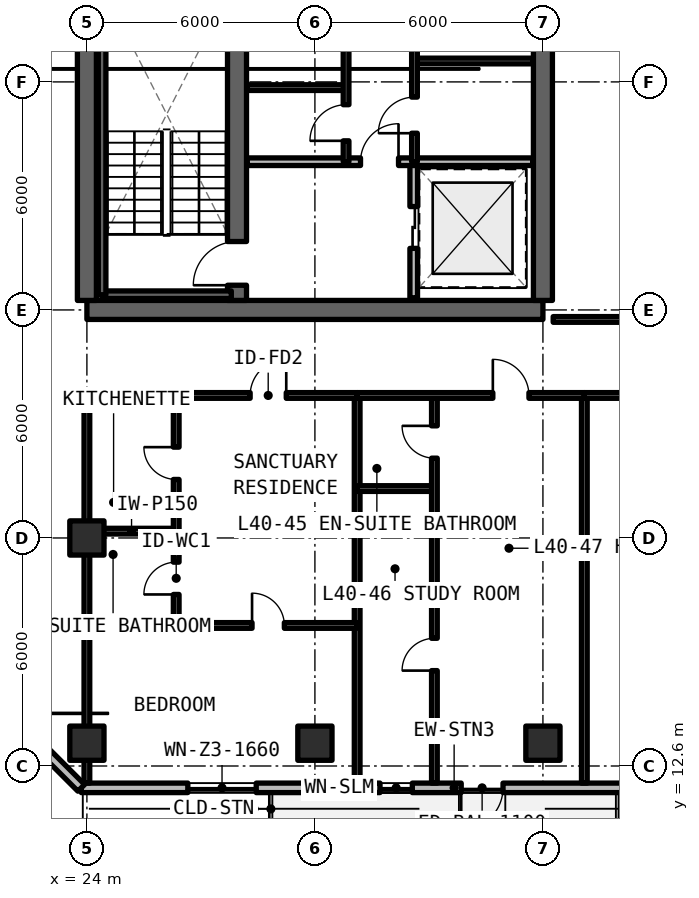
"""IFC4 building model, lengths in metres.
Left out: names, types, materials, properties, quantities, classifications, styles, units other than length and angle.
Written with IfcOpenShell. Run it as: python <this file> out.ifc"""

import sys

from ifc_helpers import new_model, si_unit, direction, frame, frame_2d, origin, origin_2d, place, context, subcontext, project, spatial, rectangle, extrude, element, fill, save


model = new_model("IFC4")
c1 = context("Model", 3, precision=1e-05, world=origin(), true_north=direction((0.0, 1.0)))
c2 = subcontext(c1, "Body", "Model", "MODEL_VIEW")
j1 = project(units=[si_unit("LENGTHUNIT", "METRE"), si_unit("PLANEANGLEUNIT", "RADIAN")], contexts=[c1])
p1 = place(None, origin())
s1 = spatial("IfcSite", under=j1, at=p1, CompositionType="ELEMENT")
p2 = place(p1, origin())
s2 = spatial("IfcBuilding", under=s1, at=p2, CompositionType="ELEMENT")
p3 = place(p2, frame((0.0, 0.0, 145.2)))
s3 = spatial("IfcBuildingStorey", under=s2, at=p3, CompositionType="ELEMENT", Elevation=145.2)
p4 = place(p3, frame((24.0, 24.6, 0.0), z_axis=(0.0, 0.0, 1.0), x_axis=(1.0, 0.0, 0.0)))
e1 = element("IfcWall", 1, at=p4, inside=s3, PredefinedType="SHEAR", context=c2, shape_type="SweptSolid", body=[
    extrude(rectangle(XDim=12.0, YDim=0.5, at=frame_2d((6.0, 0.0))), origin(), (0.0, 0.0, 1.0), 3.3),
])
p5 = place(p3, frame((24.0, 24.85, 0.0), z_axis=(0.0, 0.0, 1.0), x_axis=(0.0, 1.0, 0.0)))
e2 = element("IfcWall", 2, at=p5, inside=s3, PredefinedType="SHEAR", context=c2, shape_type="SweptSolid", body=[
    extrude(rectangle(XDim=17.5, YDim=0.5, at=frame_2d((8.75, 0.0))), origin(), (0.0, 0.0, 1.0), 3.3),
])
p6 = place(p3, frame((36.0, 24.85, 0.0), z_axis=(0.0, 0.0, 1.0), x_axis=(0.0, 1.0, 0.0)))
e3 = element("IfcWall", 3, at=p6, inside=s3, PredefinedType="SHEAR", context=c2, shape_type="SweptSolid", body=[
    extrude(rectangle(XDim=8.95, YDim=0.5, at=frame_2d((4.475, 0.0))), origin(), (0.0, 0.0, 1.0), 3.3),
])
p7 = place(p3, frame((27.95, 24.85, 0.0), z_axis=(0.0, 0.0, 1.0), x_axis=(0.0, 1.0, 0.0)))
e4 = element("IfcWall", 4, at=p7, inside=s3, PredefinedType="SHEAR", context=c2, shape_type="SweptSolid", body=[
    extrude(rectangle(XDim=17.5, YDim=0.5, at=frame_2d((8.75, 0.0))), origin(), (0.0, 0.0, 1.0), 3.3),
])
p8 = place(p7, frame((0.4, 0.0, 0.0)))
e5 = element("IfcOpeningElement", 5, at=p8, cuts=e4, PredefinedType="OPENING", context=c2, shape_type="SweptSolid", body=[
    extrude(rectangle(XDim=1.15, YDim=2.15, at=frame_2d((0.575, 1.075))), frame((0.0, 0.26, 0.0), z_axis=(0.0, -1.0, 0.0), x_axis=(1.0, 0.0, 0.0)), (0.0, 0.0, 1.0), 0.52),
])
p9 = place(p7, frame((9.6, 0.0, 0.0)))
e6 = element("IfcOpeningElement", 6, at=p9, cuts=e4, PredefinedType="OPENING", context=c2, shape_type="SweptSolid", body=[
    extrude(rectangle(XDim=1.15, YDim=2.15, at=frame_2d((0.575, 1.075))), frame((0.0, 0.26, 0.0), z_axis=(0.0, -1.0, 0.0), x_axis=(1.0, 0.0, 0.0)), (0.0, 0.0, 1.0), 0.52),
])
for number, where, z_axis, x_axis in (
    (7, (24.0, 18.6, 0.0), (0.0, 0.0, 1.0), (1.0, 0.0, 0.0)),
    (8, (24.0, 13.2, 0.0), (0.0, 0.0, 1.0), (1.0, 0.0, 0.0)),
    (9, (30.0, 13.2, 0.0), (0.0, 0.0, 1.0), (1.0, 0.0, 0.0)),
    (10, (36.0, 13.2, 0.0), (0.0, 0.0, 1.0), (1.0, 0.0, 0.0)),
):
    element("IfcColumn", number, at=place(p3, frame(where, z_axis=z_axis, x_axis=x_axis)), inside=s3, PredefinedType="COLUMN", context=c2, shape_type="SweptSolid", body=[
        extrude(rectangle(XDim=0.9, YDim=0.9, at=origin_2d()), origin(), (0.0, 0.0, 1.0), 3.3),
    ])
p10 = place(p3, frame((23.852, 12.025, 0.0), z_axis=(0.0, 0.0, 1.0), x_axis=(1.0, 0.0, 0.0)))
e11 = element("IfcWall", 11, at=p10, inside=s3, PredefinedType="SOLIDWALL", context=c2, shape_type="SweptSolid", body=[
    extrude(rectangle(XDim=19.623, YDim=0.25, at=frame_2d((9.812, 0.0))), origin(), (0.0, 0.0, 1.0), 3.08),
])
p11 = place(p10, frame((9.998, 0.0, 0.0)))
e12 = element("IfcOpeningElement", 12, at=p11, cuts=e11, PredefinedType="OPENING", context=c2, shape_type="SweptSolid", body=[
    extrude(rectangle(XDim=1.1, YDim=2.15, at=frame_2d((0.55, 1.075))), frame((0.0, 0.135, 0.0), z_axis=(0.0, -1.0, 0.0), x_axis=(1.0, 0.0, 0.0)), (0.0, 0.0, 1.0), 0.27),
])
p12 = place(p10, frame((2.804, 0.0, 0.78)))
e13 = element("IfcOpeningElement", 13, at=p12, cuts=e11, PredefinedType="OPENING", context=c2, shape_type="SweptSolid", body=[
    extrude(rectangle(XDim=1.8, YDim=1.66, at=frame_2d((0.9, 0.83))), frame((0.0, 0.135, 0.0), z_axis=(0.0, -1.0, 0.0), x_axis=(1.0, 0.0, 0.0)), (0.0, 0.0, 1.0), 0.27),
])
p13 = place(p10, frame((7.861, 0.0, 0.78)))
e14 = element("IfcOpeningElement", 14, at=p13, cuts=e11, PredefinedType="OPENING", context=c2, shape_type="SweptSolid", body=[
    extrude(rectangle(XDim=0.85, YDim=1.65, at=frame_2d((0.425, 0.825))), frame((0.0, 0.135, 0.0), z_axis=(0.0, -1.0, 0.0), x_axis=(1.0, 0.0, 0.0)), (0.0, 0.0, 1.0), 0.27),
])
p14 = place(p10, frame((15.533, 0.0, 0.78)))
e15 = element("IfcOpeningElement", 15, at=p14, cuts=e11, PredefinedType="OPENING", context=c2, shape_type="SweptSolid", body=[
    extrude(rectangle(XDim=1.8, YDim=1.66, at=frame_2d((0.9, 0.83))), frame((0.0, 0.135, 0.0), z_axis=(0.0, -1.0, 0.0), x_axis=(1.0, 0.0, 0.0)), (0.0, 0.0, 1.0), 0.27),
])
p15 = place(p3, frame((19.725, 16.152, 0.0), z_axis=(0.0, 0.0, 1.0), x_axis=(0.70708586489, -0.707127696864, 0.0)))
e16 = element("IfcWall", 16, at=p15, inside=s3, PredefinedType="SOLIDWALL", context=c2, shape_type="SweptSolid", body=[
    extrude(rectangle(XDim=5.836, YDim=0.25, at=frame_2d((2.918, 0.0))), origin(), (0.0, 0.0, 1.0), 3.08),
])
p16 = place(p15, frame((0.898, 0.0, 0.78)))
e17 = element("IfcOpeningElement", 17, at=p16, cuts=e16, PredefinedType="OPENING", context=c2, shape_type="SweptSolid", body=[
    extrude(rectangle(XDim=3.4, YDim=1.66, at=frame_2d((1.7, 0.83))), frame((0.0, 0.135, 0.0), z_axis=(0.0, -1.0, 0.0), x_axis=(1.0, 0.0, 0.0)), (0.0, 0.0, 1.0), 0.27),
])
p17 = place(p3, frame((32.6, 24.92, 0.0), z_axis=(0.0, 0.0, 1.0), x_axis=(0.0, 1.0, 0.0)))
e18 = element("IfcWall", 18, at=p17, inside=s3, PredefinedType="SOLIDWALL", context=c2, shape_type="SweptSolid", body=[
    extrude(rectangle(XDim=3.58, YDim=0.2, at=frame_2d((1.79, 0.0))), origin(), (0.0, 0.0, 1.0), 2.35),
])
p18 = place(p17, frame((1.3, 0.0, 0.0)))
e19 = element("IfcOpeningElement", 19, at=p18, cuts=e18, PredefinedType="OPENING", context=c2, shape_type="SweptSolid", body=[
    extrude(rectangle(XDim=1.1, YDim=2.2, at=frame_2d((0.55, 1.1))), frame((0.0, 0.11, 0.0), z_axis=(0.0, -1.0, 0.0), x_axis=(1.0, 0.0, 0.0)), (0.0, 0.0, 1.0), 0.22),
])
p19 = place(p3, frame((28.22, 28.5, 0.0), z_axis=(0.0, 0.0, 1.0), x_axis=(1.0, 0.0, 0.0)))
e20 = element("IfcWall", 20, at=p19, inside=s3, PredefinedType="SOLIDWALL", context=c2, shape_type="SweptSolid", body=[
    extrude(rectangle(XDim=7.51, YDim=0.2, at=frame_2d((3.755, 0.0))), origin(), (0.0, 0.0, 1.0), 2.35),
])
p20 = place(p19, frame((2.98, 0.0, 0.0)))
e21 = element("IfcOpeningElement", 21, at=p20, cuts=e20, PredefinedType="OPENING", context=c2, shape_type="SweptSolid", body=[
    extrude(rectangle(XDim=1.0, YDim=2.15, at=frame_2d((0.5, 1.075))), frame((0.0, 0.11, 0.0), z_axis=(0.0, -1.0, 0.0), x_axis=(1.0, 0.0, 0.0)), (0.0, 0.0, 1.0), 0.22),
])
p21 = place(p3, frame((28.22, 30.45, 0.0), z_axis=(0.0, 0.0, 1.0), x_axis=(1.0, 0.0, 0.0)))
e22 = element("IfcWall", 22, at=p21, inside=s3, PredefinedType="SOLIDWALL", context=c2, shape_type="SweptSolid", body=[
    extrude(rectangle(XDim=2.58, YDim=0.15, at=frame_2d((1.29, 0.0))), origin(), (0.0, 0.0, 1.0), 2.35),
])
p22 = place(p3, frame((30.82, 28.5, 0.0), z_axis=(0.0, 0.0, 1.0), x_axis=(0.0, 1.0, 0.0)))
e23 = element("IfcWall", 23, at=p22, inside=s3, PredefinedType="SOLIDWALL", context=c2, shape_type="SweptSolid", body=[
    extrude(rectangle(XDim=5.22, YDim=0.15, at=frame_2d((2.61, 0.0))), origin(), (0.0, 0.0, 1.0), 2.35),
])
p23 = place(p22, frame((0.55, 0.0, 0.0)))
e24 = element("IfcOpeningElement", 24, at=p23, cuts=e23, PredefinedType="OPENING", context=c2, shape_type="SweptSolid", body=[
    extrude(rectangle(XDim=0.95, YDim=2.15, at=frame_2d((0.475, 1.075))), frame((0.0, 0.085, 0.0), z_axis=(0.0, -1.0, 0.0), x_axis=(1.0, 0.0, 0.0)), (0.0, 0.0, 1.0), 0.17),
])
p24 = place(p22, frame((3.35, 0.0, 0.0)))
e25 = element("IfcOpeningElement", 25, at=p24, cuts=e23, PredefinedType="OPENING", context=c2, shape_type="SweptSolid", body=[
    extrude(rectangle(XDim=0.95, YDim=2.15, at=frame_2d((0.475, 1.075))), frame((0.0, 0.085, 0.0), z_axis=(0.0, -1.0, 0.0), x_axis=(1.0, 0.0, 0.0)), (0.0, 0.0, 1.0), 0.17),
])
p25 = place(p3, frame((32.68, 31.15, 0.0), z_axis=(0.0, 0.0, 1.0), x_axis=(1.0, 0.0, 0.0)))
e26 = element("IfcWall", 26, at=p25, inside=s3, PredefinedType="SOLIDWALL", context=c2, shape_type="SweptSolid", body=[
    extrude(rectangle(XDim=3.05, YDim=0.15, at=frame_2d((1.525, 0.0))), origin(), (0.0, 0.0, 1.0), 2.35),
])
p26 = place(p3, frame((32.62, 28.5, 0.0), z_axis=(0.0, 0.0, 1.0), x_axis=(0.0, 1.0, 0.0)))
e27 = element("IfcWall", 27, at=p26, inside=s3, PredefinedType="SOLIDWALL", context=c2, shape_type="SweptSolid", body=[
    extrude(rectangle(XDim=5.22, YDim=0.15, at=frame_2d((2.61, 0.0))), origin(), (0.0, 0.0, 1.0), 2.35),
])
p27 = place(p26, frame((0.75, 0.0, 0.0)))
e28 = element("IfcOpeningElement", 28, at=p27, cuts=e27, PredefinedType="OPENING", context=c2, shape_type="SweptSolid", body=[
    extrude(rectangle(XDim=0.95, YDim=2.15, at=frame_2d((0.475, 1.075))), frame((0.0, 0.085, 0.0), z_axis=(0.0, -1.0, 0.0), x_axis=(1.0, 0.0, 0.0)), (0.0, 0.0, 1.0), 0.17),
])
p28 = place(p26, frame((3.35, 0.0, 0.0)))
e29 = element("IfcOpeningElement", 29, at=p28, cuts=e27, PredefinedType="OPENING", context=c2, shape_type="SweptSolid", body=[
    extrude(rectangle(XDim=0.95, YDim=2.15, at=frame_2d((0.475, 1.075))), frame((0.0, 0.085, 0.0), z_axis=(0.0, -1.0, 0.0), x_axis=(1.0, 0.0, 0.0)), (0.0, 0.0, 1.0), 0.17),
])
p29 = place(p3, frame((36.27, 24.35, 0.0), z_axis=(0.0, 0.0, 1.0), x_axis=(1.0, 0.0, 0.0)))
e30 = element("IfcWall", 30, at=p29, inside=s3, PredefinedType="SOLIDWALL", context=c2, shape_type="SweptSolid", body=[
    extrude(rectangle(XDim=7.88, YDim=0.15, at=frame_2d((3.94, 0.0))), origin(), (0.0, 0.0, 1.0), 2.35),
])
for number, where, z_axis, x_axis in (
    (31, (24.0, 12.15, 0.0), (0.0, 0.0, 1.0), (0.0, 1.0, 0.0)),
    (32, (31.112, 12.15, 0.0), (0.0, 0.0, 1.0), (0.0, 1.0, 0.0)),
):
    element("IfcWall", number, at=place(p3, frame(where, z_axis=z_axis, x_axis=x_axis)), inside=s3, PredefinedType="SOLIDWALL", context=c2, shape_type="SweptSolid", body=[
        extrude(rectangle(XDim=10.2, YDim=0.15, at=frame_2d((5.1, 0.0))), origin(), (0.0, 0.0, 1.0), 2.35),
    ])
p30 = place(p3, frame((24.0, 18.779, 0.0), z_axis=(0.0, 0.0, 1.0), x_axis=(1.0, 0.0, 0.0)))
e33 = element("IfcWall", 33, at=p30, inside=s3, PredefinedType="PARTITIONING", context=c2, shape_type="SweptSolid", body=[
    extrude(rectangle(XDim=2.35, YDim=0.15, at=frame_2d((1.175, 0.0))), origin(), (0.0, 0.0, 1.0), 2.35),
])
p31 = place(p3, frame((26.35, 16.298, 0.0), z_axis=(0.0, 0.0, 1.0), x_axis=(0.0, 1.0, 0.0)))
e34 = element("IfcWall", 34, at=p31, inside=s3, PredefinedType="PARTITIONING", context=c2, shape_type="SweptSolid", body=[
    extrude(rectangle(XDim=6.052, YDim=0.15, at=frame_2d((3.026, 0.0))), origin(), (0.0, 0.0, 1.0), 2.35),
])
p32 = place(p31, frame((0.816, 0.0, 0.0)))
e35 = element("IfcOpeningElement", 35, at=p32, cuts=e34, PredefinedType="OPENING", context=c2, shape_type="SweptSolid", body=[
    extrude(rectangle(XDim=0.85, YDim=2.1, at=frame_2d((0.425, 1.05))), frame((0.0, 0.085, 0.0), z_axis=(0.0, -1.0, 0.0), x_axis=(1.0, 0.0, 0.0)), (0.0, 0.0, 1.0), 0.17),
])
p33 = place(p31, frame((3.842, 0.0, 0.0)))
e36 = element("IfcOpeningElement", 36, at=p33, cuts=e34, PredefinedType="OPENING", context=c2, shape_type="SweptSolid", body=[
    extrude(rectangle(XDim=0.85, YDim=2.1, at=frame_2d((0.425, 1.05))), frame((0.0, 0.085, 0.0), z_axis=(0.0, -1.0, 0.0), x_axis=(1.0, 0.0, 0.0)), (0.0, 0.0, 1.0), 0.17),
])
p34 = place(p3, frame((24.0, 16.298, 0.0), z_axis=(0.0, 0.0, 1.0), x_axis=(1.0, 0.0, 0.0)))
e37 = element("IfcWall", 37, at=p34, inside=s3, PredefinedType="PARTITIONING", context=c2, shape_type="SweptSolid", body=[
    extrude(rectangle(XDim=7.112, YDim=0.15, at=frame_2d((3.556, 0.0))), origin(), (0.0, 0.0, 1.0), 2.35),
])
p35 = place(p34, frame((4.346, 0.0, 0.0)))
e38 = element("IfcOpeningElement", 38, at=p35, cuts=e37, PredefinedType="OPENING", context=c2, shape_type="SweptSolid", body=[
    extrude(rectangle(XDim=0.85, YDim=2.1, at=frame_2d((0.425, 1.05))), frame((0.0, 0.085, 0.0), z_axis=(0.0, -1.0, 0.0), x_axis=(1.0, 0.0, 0.0)), (0.0, 0.0, 1.0), 0.17),
])
p36 = place(p3, frame((24.0, 22.35, 0.0), z_axis=(0.0, 0.0, 1.0), x_axis=(1.0, 0.0, 0.0)))
e39 = element("IfcWall", 39, at=p36, inside=s3, PredefinedType="SOLIDWALL", context=c2, shape_type="SweptSolid", body=[
    extrude(rectangle(XDim=7.112, YDim=0.15, at=frame_2d((3.556, 0.0))), origin(), (0.0, 0.0, 1.0), 2.35),
])
p37 = place(p36, frame((4.296, 0.0, 0.0)))
e40 = element("IfcOpeningElement", 40, at=p37, cuts=e39, PredefinedType="OPENING", context=c2, shape_type="SweptSolid", body=[
    extrude(rectangle(XDim=0.95, YDim=2.15, at=frame_2d((0.475, 1.075))), frame((0.0, 0.085, 0.0), z_axis=(0.0, -1.0, 0.0), x_axis=(1.0, 0.0, 0.0)), (0.0, 0.0, 1.0), 0.17),
])
p38 = place(p3, frame((37.09, 12.15, 0.0), z_axis=(0.0, 0.0, 1.0), x_axis=(0.0, 1.0, 0.0)))
e41 = element("IfcWall", 41, at=p38, inside=s3, PredefinedType="SOLIDWALL", context=c2, shape_type="SweptSolid", body=[
    extrude(rectangle(XDim=10.2, YDim=0.15, at=frame_2d((5.1, 0.0))), origin(), (0.0, 0.0, 1.0), 2.35),
])
p39 = place(p3, frame((31.112, 19.9, 0.0), z_axis=(0.0, 0.0, 1.0), x_axis=(1.0, 0.0, 0.0)))
e42 = element("IfcWall", 42, at=p39, inside=s3, PredefinedType="PARTITIONING", context=c2, shape_type="SweptSolid", body=[
    extrude(rectangle(XDim=2.032, YDim=0.15, at=frame_2d((1.016, 0.0))), origin(), (0.0, 0.0, 1.0), 2.35),
])
p40 = place(p3, frame((33.144, 12.15, 0.0), z_axis=(0.0, 0.0, 1.0), x_axis=(0.0, 1.0, 0.0)))
e43 = element("IfcWall", 43, at=p40, inside=s3, PredefinedType="PARTITIONING", context=c2, shape_type="SweptSolid", body=[
    extrude(rectangle(XDim=10.2, YDim=0.15, at=frame_2d((5.1, 0.0))), origin(), (0.0, 0.0, 1.0), 2.35),
])
p41 = place(p40, frame((2.96, 0.0, 0.0)))
e44 = element("IfcOpeningElement", 44, at=p41, cuts=e43, PredefinedType="OPENING", context=c2, shape_type="SweptSolid", body=[
    extrude(rectangle(XDim=0.85, YDim=2.1, at=frame_2d((0.425, 1.05))), frame((0.0, 0.085, 0.0), z_axis=(0.0, -1.0, 0.0), x_axis=(1.0, 0.0, 0.0)), (0.0, 0.0, 1.0), 0.17),
])
p42 = place(p40, frame((8.55, 0.0, 0.0)))
e45 = element("IfcOpeningElement", 45, at=p42, cuts=e43, PredefinedType="OPENING", context=c2, shape_type="SweptSolid", body=[
    extrude(rectangle(XDim=0.85, YDim=2.1, at=frame_2d((0.425, 1.05))), frame((0.0, 0.085, 0.0), z_axis=(0.0, -1.0, 0.0), x_axis=(1.0, 0.0, 0.0)), (0.0, 0.0, 1.0), 0.17),
])
p43 = place(p3, frame((31.112, 22.35, 0.0), z_axis=(0.0, 0.0, 1.0), x_axis=(1.0, 0.0, 0.0)))
e46 = element("IfcWall", 46, at=p43, inside=s3, PredefinedType="SOLIDWALL", context=c2, shape_type="SweptSolid", body=[
    extrude(rectangle(XDim=5.978, YDim=0.15, at=frame_2d((2.989, 0.0))), origin(), (0.0, 0.0, 1.0), 2.35),
])
p44 = place(p43, frame((3.57, 0.0, 0.0)))
e47 = element("IfcOpeningElement", 47, at=p44, cuts=e46, PredefinedType="OPENING", context=c2, shape_type="SweptSolid", body=[
    extrude(rectangle(XDim=0.95, YDim=2.15, at=frame_2d((0.475, 1.075))), frame((0.0, 0.085, 0.0), z_axis=(0.0, -1.0, 0.0), x_axis=(1.0, 0.0, 0.0)), (0.0, 0.0, 1.0), 0.17),
])
p45 = place(p3, frame((37.09, 22.35, 0.0), z_axis=(0.0, 0.0, 1.0), x_axis=(1.0, 0.0, 0.0)))
e48 = element("IfcWall", 48, at=p45, inside=s3, PredefinedType="SOLIDWALL", context=c2, shape_type="SweptSolid", body=[
    extrude(rectangle(XDim=6.39, YDim=0.15, at=frame_2d((3.195, 0.0))), origin(), (0.0, 0.0, 1.0), 2.35),
])
p46 = place(p45, frame((2.645, 0.0, 0.0)))
e49 = element("IfcOpeningElement", 49, at=p46, cuts=e48, PredefinedType="OPENING", context=c2, shape_type="SweptSolid", body=[
    extrude(rectangle(XDim=1.1, YDim=2.15, at=frame_2d((0.55, 1.075))), frame((0.0, 0.085, 0.0), z_axis=(0.0, -1.0, 0.0), x_axis=(1.0, 0.0, 0.0)), (0.0, 0.0, 1.0), 0.17),
])
p47 = place(p3, frame((24.4, 25.0, 0.0), z_axis=(0.0, 0.0, 1.0), x_axis=(1.0, 0.0, 0.0)))
e50 = element("IfcWall", 50, at=p47, inside=s3, PredefinedType="SOLIDWALL", context=c2, shape_type="SweptSolid", body=[
    extrude(rectangle(XDim=3.4, YDim=0.2, at=frame_2d((1.7, 0.0))), origin(), (0.0, 0.0, 1.0), 3.3),
])
p48 = place(p3, frame((24.4, 33.0, 0.0), z_axis=(0.0, 0.0, 1.0), x_axis=(0.0, -1.0, 0.0)))
e51 = element("IfcWall", 51, at=p48, inside=s3, PredefinedType="SOLIDWALL", context=c2, shape_type="SweptSolid", body=[
    extrude(rectangle(XDim=8.0, YDim=0.2, at=frame_2d((4.0, 0.0))), origin(), (0.0, 0.0, 1.0), 3.3),
])
p49 = place(p11, frame((1.1, 0.0, 0.0), z_axis=(0.0, 0.0, 1.0), x_axis=(-1.0, 0.0, 0.0)))
e52 = element("IfcDoor", 52, at=p49, inside=s3, OperationType="SINGLE_SWING_RIGHT", PredefinedType="DOOR", context=c2, shape_type="SweptSolid", body=[
    extrude(rectangle(XDim=1.1, YDim=2.15, at=frame_2d((0.55, 1.075))), frame((0.0, 0.025, 0.0), z_axis=(0.0, -1.0, 0.0), x_axis=(1.0, 0.0, 0.0)), (0.0, 0.0, 1.0), 0.05),
])
fill(e12, e52)
p50 = place(p12, origin())
e53 = element("IfcWindow", 53, at=p50, inside=s3, PartitioningType="SINGLE_PANEL", PredefinedType="WINDOW", context=c2, shape_type="SweptSolid", body=[
    extrude(rectangle(XDim=1.8, YDim=1.66, at=frame_2d((0.9, 0.83))), frame((0.0, 0.03, 0.0), z_axis=(0.0, -1.0, 0.0), x_axis=(1.0, 0.0, 0.0)), (0.0, 0.0, 1.0), 0.06),
])
fill(e13, e53)
p51 = place(p13, origin())
e54 = element("IfcWindow", 54, at=p51, inside=s3, PartitioningType="SINGLE_PANEL", PredefinedType="WINDOW", context=c2, shape_type="SweptSolid", body=[
    extrude(rectangle(XDim=0.85, YDim=1.65, at=frame_2d((0.425, 0.825))), frame((0.0, 0.03, 0.0), z_axis=(0.0, -1.0, 0.0), x_axis=(1.0, 0.0, 0.0)), (0.0, 0.0, 1.0), 0.06),
])
fill(e14, e54)
p52 = place(p18, origin())
e55 = element("IfcDoor", 55, at=p52, inside=s3, OperationType="SLIDING_TO_LEFT", PredefinedType="DOOR", context=c2, shape_type="SweptSolid", body=[
    extrude(rectangle(XDim=1.1, YDim=2.2, at=frame_2d((0.55, 1.1))), frame((0.0, 0.025, 0.0), z_axis=(0.0, -1.0, 0.0), x_axis=(1.0, 0.0, 0.0)), (0.0, 0.0, 1.0), 0.05),
])
fill(e19, e55)
p53 = place(p20, origin())
e56 = element("IfcDoor", 56, at=p53, inside=s3, OperationType="SINGLE_SWING_RIGHT", PredefinedType="DOOR", context=c2, shape_type="SweptSolid", body=[
    extrude(rectangle(XDim=1.0, YDim=2.15, at=frame_2d((0.5, 1.075))), frame((0.0, 0.025, 0.0), z_axis=(0.0, -1.0, 0.0), x_axis=(1.0, 0.0, 0.0)), (0.0, 0.0, 1.0), 0.05),
])
fill(e21, e56)
p54 = place(p23, origin())
e57 = element("IfcDoor", 57, at=p54, inside=s3, OperationType="SINGLE_SWING_LEFT", PredefinedType="DOOR", context=c2, shape_type="SweptSolid", body=[
    extrude(rectangle(XDim=0.95, YDim=2.15, at=frame_2d((0.475, 1.075))), frame((0.0, 0.025, 0.0), z_axis=(0.0, -1.0, 0.0), x_axis=(1.0, 0.0, 0.0)), (0.0, 0.0, 1.0), 0.05),
])
fill(e24, e57)
p55 = place(p27, origin())
e58 = element("IfcDoor", 58, at=p55, inside=s3, OperationType="SINGLE_SWING_LEFT", PredefinedType="DOOR", context=c2, shape_type="SweptSolid", body=[
    extrude(rectangle(XDim=0.95, YDim=2.15, at=frame_2d((0.475, 1.075))), frame((0.0, 0.025, 0.0), z_axis=(0.0, -1.0, 0.0), x_axis=(1.0, 0.0, 0.0)), (0.0, 0.0, 1.0), 0.05),
])
fill(e28, e58)
p56 = place(p32, origin())
e59 = element("IfcDoor", 59, at=p56, inside=s3, OperationType="SINGLE_SWING_LEFT", PredefinedType="DOOR", context=c2, shape_type="SweptSolid", body=[
    extrude(rectangle(XDim=0.85, YDim=2.1, at=frame_2d((0.425, 1.05))), frame((0.0, 0.025, 0.0), z_axis=(0.0, -1.0, 0.0), x_axis=(1.0, 0.0, 0.0)), (0.0, 0.0, 1.0), 0.05),
])
fill(e35, e59)
p57 = place(p33, origin())
e60 = element("IfcDoor", 60, at=p57, inside=s3, OperationType="SINGLE_SWING_RIGHT", PredefinedType="DOOR", context=c2, shape_type="SweptSolid", body=[
    extrude(rectangle(XDim=0.85, YDim=2.1, at=frame_2d((0.425, 1.05))), frame((0.0, 0.025, 0.0), z_axis=(0.0, -1.0, 0.0), x_axis=(1.0, 0.0, 0.0)), (0.0, 0.0, 1.0), 0.05),
])
fill(e36, e60)
p58 = place(p35, origin())
e61 = element("IfcDoor", 61, at=p58, inside=s3, OperationType="SINGLE_SWING_LEFT", PredefinedType="DOOR", context=c2, shape_type="SweptSolid", body=[
    extrude(rectangle(XDim=0.85, YDim=2.1, at=frame_2d((0.425, 1.05))), frame((0.0, 0.025, 0.0), z_axis=(0.0, -1.0, 0.0), x_axis=(1.0, 0.0, 0.0)), (0.0, 0.0, 1.0), 0.05),
])
fill(e38, e61)
p59 = place(p37, origin())
e62 = element("IfcDoor", 62, at=p59, inside=s3, OperationType="SINGLE_SWING_RIGHT", PredefinedType="DOOR", context=c2, shape_type="SweptSolid", body=[
    extrude(rectangle(XDim=0.95, YDim=2.15, at=frame_2d((0.475, 1.075))), frame((0.0, 0.025, 0.0), z_axis=(0.0, -1.0, 0.0), x_axis=(1.0, 0.0, 0.0)), (0.0, 0.0, 1.0), 0.05),
])
fill(e40, e62)
p60 = place(p41, origin())
e63 = element("IfcDoor", 63, at=p60, inside=s3, OperationType="SINGLE_SWING_LEFT", PredefinedType="DOOR", context=c2, shape_type="SweptSolid", body=[
    extrude(rectangle(XDim=0.85, YDim=2.1, at=frame_2d((0.425, 1.05))), frame((0.0, 0.025, 0.0), z_axis=(0.0, -1.0, 0.0), x_axis=(1.0, 0.0, 0.0)), (0.0, 0.0, 1.0), 0.05),
])
fill(e44, e63)
p61 = place(p42, origin())
e64 = element("IfcDoor", 64, at=p61, inside=s3, OperationType="SINGLE_SWING_RIGHT", PredefinedType="DOOR", context=c2, shape_type="SweptSolid", body=[
    extrude(rectangle(XDim=0.85, YDim=2.1, at=frame_2d((0.425, 1.05))), frame((0.0, 0.025, 0.0), z_axis=(0.0, -1.0, 0.0), x_axis=(1.0, 0.0, 0.0)), (0.0, 0.0, 1.0), 0.05),
])
fill(e45, e64)
p62 = place(p44, origin())
e65 = element("IfcDoor", 65, at=p62, inside=s3, OperationType="SINGLE_SWING_LEFT", PredefinedType="DOOR", context=c2, shape_type="SweptSolid", body=[
    extrude(rectangle(XDim=0.95, YDim=2.15, at=frame_2d((0.475, 1.075))), frame((0.0, 0.025, 0.0), z_axis=(0.0, -1.0, 0.0), x_axis=(1.0, 0.0, 0.0)), (0.0, 0.0, 1.0), 0.05),
])
fill(e47, e65)
p63 = place(p8, origin())
e66 = element("IfcDoor", 66, at=p63, inside=s3, OperationType="SINGLE_SWING_RIGHT", PredefinedType="DOOR", context=c2, shape_type="SweptSolid", body=[
    extrude(rectangle(XDim=1.15, YDim=2.15, at=frame_2d((0.575, 1.075))), frame((0.0, 0.025, 0.0), z_axis=(0.0, -1.0, 0.0), x_axis=(1.0, 0.0, 0.0)), (0.0, 0.0, 1.0), 0.05),
])
fill(e5, e66)
save(model, sys.argv[1])
